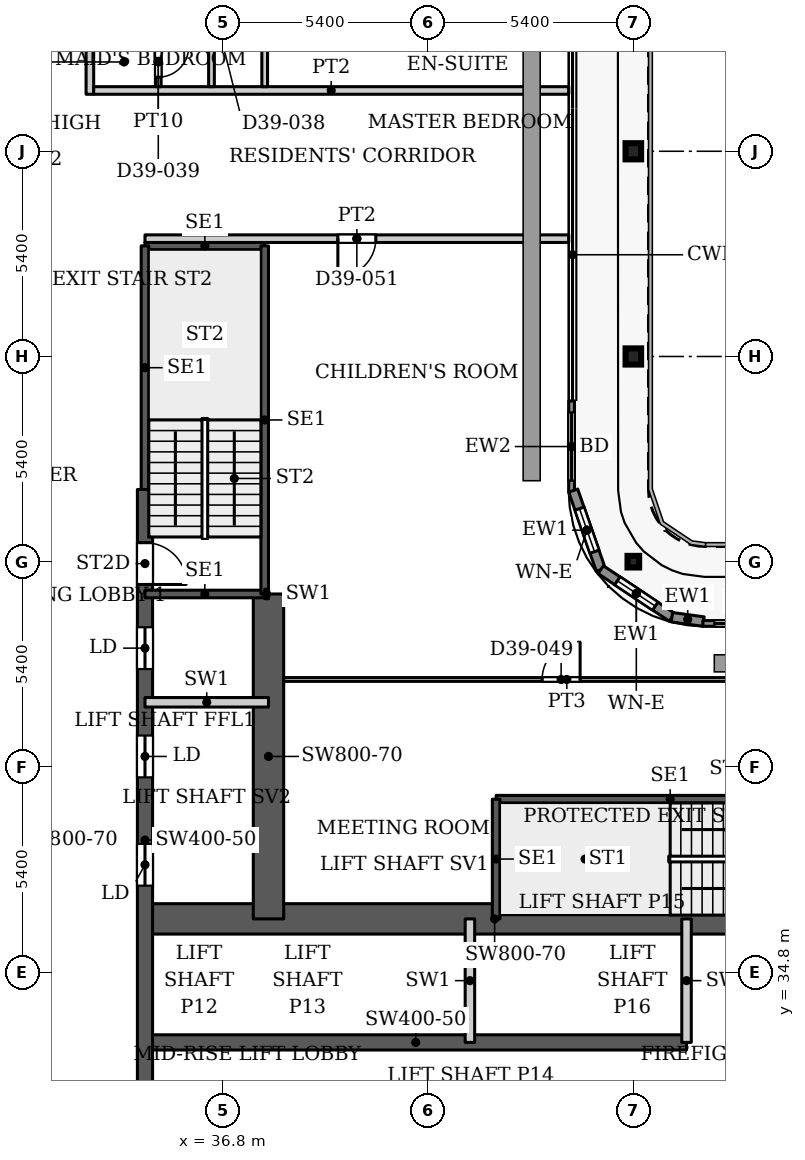
"""IFC4 building model, lengths in metres.
Left out: names, types, materials, properties, quantities, classifications, styles, units other than length and angle.
Written with IfcOpenShell. Run it as: python <this file> out.ifc"""

import sys

from ifc_helpers import new_model, si_unit, direction, frame, frame_2d, origin, origin_2d, place, context, subcontext, project, spatial, rectangle, hollow_rectangle, i_section, extrude, source, transform, mapped, element, fill, save


model = new_model("IFC4")
c1 = context("Model", 3, precision=1e-05, world=origin(), true_north=direction((0.0, 1.0)))
c2 = subcontext(c1, "Body", "Model", "MODEL_VIEW")
j1 = project(units=[si_unit("LENGTHUNIT", "METRE"), si_unit("PLANEANGLEUNIT", "RADIAN")], contexts=[c1])
p1 = place(None, origin())
s1 = spatial("IfcSite", under=j1, at=p1, CompositionType="ELEMENT")
p2 = place(p1, origin())
s2 = spatial("IfcBuilding", under=s1, at=p2, CompositionType="ELEMENT")
p3 = place(p2, frame((0.0, 0.0, 168.2)))
s3 = spatial("IfcBuildingStorey", under=s2, at=p3, CompositionType="ELEMENT", Elevation=168.2)
for number, where, z_axis, x_axis in (
    (1, (47.6, 51.0, 0.0), (0.0, 0.0, 1.0), (1.0, 0.0, 0.0)),
    (2, (47.6, 56.4, 0.0), (0.0, 0.0, 1.0), (1.0, 0.0, 0.0)),
):
    element("IfcColumn", number, at=place(p3, frame(where, z_axis=z_axis, x_axis=x_axis)), inside=s3, PredefinedType="COLUMN", context=c2, shape_type="SweptSolid", body=[
        extrude(i_section(OverallWidth=0.409, OverallDepth=0.425, WebThickness=0.033, FlangeThickness=0.052, FilletRadius=0.013, at=origin_2d()), origin(), (0.0, 0.0, 1.0), 3.9),
    ])
p4 = place(p3, frame((47.6, 45.6, 0.0), z_axis=(0.0, 0.0, 1.0), x_axis=(1.0, 0.0, 0.0)))
e3 = element("IfcColumn", 3, at=p4, inside=s3, PredefinedType="COLUMN", context=c2, shape_type="SweptSolid", body=[
    extrude(hollow_rectangle(XDim=0.305, YDim=0.305, WallThickness=0.016, InnerFilletRadius=0.016, OuterFilletRadius=0.032, at=origin_2d()), origin(), (0.0, 0.0, 1.0), 3.9),
])
p5 = place(p3, frame((34.75, 32.95, 0.0), z_axis=(0.0, 0.0, 1.0), x_axis=(1.0, 0.0, 0.0)))
e4 = element("IfcWall", 4, at=p5, inside=s3, PredefinedType="SHEAR", context=c2, shape_type="SweptSolid", body=[
    extrude(rectangle(XDim=14.25, YDim=0.4, at=frame_2d((7.125, 0.0))), origin(), (0.0, 0.0, 1.0), 3.9),
])
p6 = place(p3, frame((34.75, 36.2, 0.0), z_axis=(0.0, 0.0, 1.0), x_axis=(1.0, 0.0, 0.0)))
e5 = element("IfcWall", 5, at=p6, inside=s3, PredefinedType="SHEAR", context=c2, shape_type="SweptSolid", body=[
    extrude(rectangle(XDim=18.4, YDim=0.8, at=frame_2d((9.2, 0.0))), origin(), (0.0, 0.0, 1.0), 3.9),
])
p7 = place(p6, frame((16.9, 0.0, 0.0)))
e6 = element("IfcOpeningElement", 6, at=p7, cuts=e5, PredefinedType="OPENING", context=c2, shape_type="SweptSolid", body=[
    extrude(rectangle(XDim=1.0, YDim=2.2, at=frame_2d((0.5, 1.1))), frame((0.0, 0.41, 0.0), z_axis=(0.0, -1.0, 0.0), x_axis=(1.0, 0.0, 0.0)), (0.0, 0.0, 1.0), 0.82),
])
p8 = place(p3, frame((34.75, 29.05, 0.0), z_axis=(0.0, 0.0, 1.0), x_axis=(0.0, 1.0, 0.0)))
e7 = element("IfcWall", 7, at=p8, inside=s3, PredefinedType="SHEAR", context=c2, shape_type="SweptSolid", body=[
    extrude(rectangle(XDim=18.45, YDim=0.4, at=frame_2d((9.225, 0.0))), origin(), (0.0, 0.0, 1.0), 3.9),
])
p9 = place(p8, frame((8.025, 0.0, 0.0)))
e8 = element("IfcOpeningElement", 8, at=p9, cuts=e7, PredefinedType="OPENING", context=c2, shape_type="SweptSolid", body=[
    extrude(rectangle(XDim=1.1, YDim=2.2, at=frame_2d((0.55, 1.1))), frame((0.0, 0.21, 0.0), z_axis=(0.0, -1.0, 0.0), x_axis=(1.0, 0.0, 0.0)), (0.0, 0.0, 1.0), 0.42),
])
p10 = place(p8, frame((10.875, 0.0, 0.0)))
e9 = element("IfcOpeningElement", 9, at=p10, cuts=e7, PredefinedType="OPENING", context=c2, shape_type="SweptSolid", body=[
    extrude(rectangle(XDim=1.1, YDim=2.2, at=frame_2d((0.55, 1.1))), frame((0.0, 0.21, 0.0), z_axis=(0.0, -1.0, 0.0), x_axis=(1.0, 0.0, 0.0)), (0.0, 0.0, 1.0), 0.42),
])
p11 = place(p8, frame((13.725, 0.0, 0.0)))
e10 = element("IfcOpeningElement", 10, at=p11, cuts=e7, PredefinedType="OPENING", context=c2, shape_type="SweptSolid", body=[
    extrude(rectangle(XDim=1.1, YDim=2.2, at=frame_2d((0.55, 1.1))), frame((0.0, 0.21, 0.0), z_axis=(0.0, -1.0, 0.0), x_axis=(1.0, 0.0, 0.0)), (0.0, 0.0, 1.0), 0.42),
])
p12 = place(p8, frame((15.95, 0.0, 0.0)))
e11 = element("IfcOpeningElement", 11, at=p12, cuts=e7, PredefinedType="OPENING", context=c2, shape_type="SweptSolid", body=[
    extrude(rectangle(XDim=1.1, YDim=2.2, at=frame_2d((0.55, 1.1))), frame((0.0, 0.21, 0.0), z_axis=(0.0, -1.0, 0.0), x_axis=(1.0, 0.0, 0.0)), (0.0, 0.0, 1.0), 0.42),
])
p13 = place(p3, frame((38.0, 36.2, 0.0), z_axis=(0.0, 0.0, 1.0), x_axis=(0.0, 1.0, 0.0)))
e12 = element("IfcWall", 12, at=p13, inside=s3, PredefinedType="SHEAR", context=c2, shape_type="SweptSolid", body=[
    extrude(rectangle(XDim=8.55, YDim=0.8, at=frame_2d((4.275, 0.0))), origin(), (0.0, 0.0, 1.0), 3.9),
])
p14 = place(p3, frame((45.975, 49.83, 0.0), z_axis=(0.0, 0.0, 1.0), x_axis=(0.0, -1.0, 0.0)))
e13 = element("IfcWall", 13, at=p14, inside=s3, PredefinedType="SOLIDWALL", context=c2, shape_type="SweptSolid", body=[
    extrude(rectangle(XDim=2.4, YDim=0.15, at=frame_2d((1.2, 0.0))), origin(), (0.0, 0.0, 1.0), 3.75),
])
p15 = place(p14, frame((0.3, 0.0, 0.0)))
e14 = element("IfcOpeningElement", 14, at=p15, cuts=e13, PredefinedType="OPENING", context=c2, shape_type="SweptSolid", body=[
    extrude(rectangle(XDim=1.8, YDim=2.4, at=frame_2d((0.9, 1.2))), frame((0.0, 0.085, 0.0), z_axis=(0.0, -1.0, 0.0), x_axis=(1.0, 0.0, 0.0)), (0.0, 0.0, 1.0), 0.17),
])
p16 = place(p3, frame((46.018, 47.471, 0.0), z_axis=(0.0, 0.0, 1.0), x_axis=(0.328791208903, -0.944402637093, 0.0)))
e15 = element("IfcWall", 15, at=p16, inside=s3, PredefinedType="SOLIDWALL", context=c2, shape_type="SweptSolid", body=[
    extrude(rectangle(XDim=2.205, YDim=0.25, at=frame_2d((1.102, 0.0))), origin(), (0.0, 0.0, 1.0), 3.75),
])
p17 = place(p16, frame((0.503, 0.0, 0.6)))
e16 = element("IfcOpeningElement", 16, at=p17, cuts=e15, PredefinedType="OPENING", context=c2, shape_type="SweptSolid", body=[
    extrude(rectangle(XDim=1.2, YDim=2.1, at=frame_2d((0.6, 1.05))), frame((0.0, 0.135, 0.0), z_axis=(0.0, -1.0, 0.0), x_axis=(1.0, 0.0, 0.0)), (0.0, 0.0, 1.0), 0.27),
])
p18 = place(p3, frame((46.743, 45.389, 0.0), z_axis=(0.0, 0.0, 1.0), x_axis=(0.831449265529, -0.555600682912, 0.0)))
e17 = element("IfcWall", 17, at=p18, inside=s3, PredefinedType="SOLIDWALL", context=c2, shape_type="SweptSolid", body=[
    extrude(rectangle(XDim=2.251, YDim=0.25, at=frame_2d((1.126, 0.0))), origin(), (0.0, 0.0, 1.0), 3.75),
])
p19 = place(p18, frame((0.525, 0.0, 0.6)))
e18 = element("IfcOpeningElement", 18, at=p19, cuts=e17, PredefinedType="OPENING", context=c2, shape_type="SweptSolid", body=[
    extrude(rectangle(XDim=1.2, YDim=2.1, at=frame_2d((0.6, 1.05))), frame((0.0, 0.135, 0.0), z_axis=(0.0, -1.0, 0.0), x_axis=(1.0, 0.0, 0.0)), (0.0, 0.0, 1.0), 0.27),
])
p20 = place(p3, frame((48.615, 44.138, 0.0), z_axis=(0.0, 0.0, 1.0), x_axis=(0.990741504246, -0.135761819977, 0.0)))
e19 = element("IfcWall", 19, at=p20, inside=s3, PredefinedType="SOLIDWALL", context=c2, shape_type="SweptSolid", body=[
    extrude(rectangle(XDim=0.84, YDim=0.25, at=frame_2d((0.42, 0.0))), origin(), (0.0, 0.0, 1.0), 3.75),
])
p21 = place(p3, frame((49.43, 43.975, 0.0), z_axis=(0.0, 0.0, 1.0), x_axis=(1.0, 0.0, 0.0)))
e20 = element("IfcWall", 20, at=p21, inside=s3, PredefinedType="SOLIDWALL", context=c2, shape_type="SweptSolid", body=[
    extrude(rectangle(XDim=2.4, YDim=0.15, at=frame_2d((1.2, 0.0))), origin(), (0.0, 0.0, 1.0), 3.75),
])
p22 = place(p21, frame((0.3, 0.0, 0.0)))
e21 = element("IfcOpeningElement", 21, at=p22, cuts=e20, PredefinedType="OPENING", context=c2, shape_type="SweptSolid", body=[
    extrude(rectangle(XDim=1.8, YDim=2.4, at=frame_2d((0.9, 1.2))), frame((0.0, 0.085, 0.0), z_axis=(0.0, -1.0, 0.0), x_axis=(1.0, 0.0, 0.0)), (0.0, 0.0, 1.0), 0.17),
])
p23 = place(p3, frame((43.99, 39.35, 0.0), z_axis=(0.0, 0.0, 1.0), x_axis=(1.0, 0.0, 0.0)))
e22 = element("IfcWall", 22, at=p23, inside=s3, PredefinedType="SHEAR", context=c2, shape_type="SweptSolid", body=[
    extrude(rectangle(XDim=9.16, YDim=0.2, at=frame_2d((4.58, 0.0))), origin(), (0.0, 0.0, 1.0), 3.9),
])
p24 = place(p3, frame((43.99, 36.2, 0.0), z_axis=(0.0, 0.0, 1.0), x_axis=(0.0, 1.0, 0.0)))
e23 = element("IfcWall", 23, at=p24, inside=s3, PredefinedType="SHEAR", context=c2, shape_type="SweptSolid", body=[
    extrude(rectangle(XDim=3.15, YDim=0.2, at=frame_2d((1.575, 0.0))), origin(), (0.0, 0.0, 1.0), 3.9),
])
for number, where, z_axis, x_axis in (
    (24, (34.75, 44.75, 0.0), (0.0, 0.0, 1.0), (1.0, 0.0, 0.0)),
    (25, (34.75, 53.91, 0.0), (0.0, 0.0, 1.0), (1.0, 0.0, 0.0)),
):
    element("IfcWall", number, at=place(p3, frame(where, z_axis=z_axis, x_axis=x_axis)), inside=s3, PredefinedType="SHEAR", context=c2, shape_type="SweptSolid", body=[
        extrude(rectangle(XDim=3.15, YDim=0.2, at=frame_2d((1.575, 0.0))), origin(), (0.0, 0.0, 1.0), 3.9),
    ])
p25 = place(p3, frame((34.75, 47.5, 0.0), z_axis=(0.0, 0.0, 1.0), x_axis=(0.0, 1.0, 0.0)))
e26 = element("IfcWall", 26, at=p25, inside=s3, PredefinedType="SHEAR", context=c2, shape_type="SweptSolid", body=[
    extrude(rectangle(XDim=6.41, YDim=0.2, at=frame_2d((3.205, 0.0))), origin(), (0.0, 0.0, 1.0), 3.9),
])
p26 = place(p3, frame((37.9, 44.75, 0.0), z_axis=(0.0, 0.0, 1.0), x_axis=(0.0, 1.0, 0.0)))
e27 = element("IfcWall", 27, at=p26, inside=s3, PredefinedType="SHEAR", context=c2, shape_type="SweptSolid", body=[
    extrude(rectangle(XDim=9.16, YDim=0.2, at=frame_2d((4.58, 0.0))), origin(), (0.0, 0.0, 1.0), 3.9),
])
for number, where, z_axis, x_axis in (
    (28, (43.3, 32.95, 0.0), (0.0, 0.0, 1.0), (0.0, 1.0, 0.0)),
    (29, (49.0, 32.95, 0.0), (0.0, 0.0, 1.0), (0.0, 1.0, 0.0)),
    (30, (34.75, 41.9, 0.0), (0.0, 0.0, 1.0), (1.0, 0.0, 0.0)),
):
    element("IfcWall", number, at=place(p3, frame(where, z_axis=z_axis, x_axis=x_axis)), inside=s3, PredefinedType="PARTITIONING", context=c2, shape_type="SweptSolid", body=[
        extrude(rectangle(XDim=3.25, YDim=0.25, at=frame_2d((1.625, 0.0))), origin(), (0.0, 0.0, 1.0), 3.9),
    ])
p27 = place(p3, frame((37.9, 44.75, 0.0), z_axis=(0.0, 0.0, 1.0), x_axis=(1.0, 0.0, 0.0)))
e31 = element("IfcWall", 31, at=p27, inside=s3, PredefinedType="PARTITIONING", context=c2, shape_type="SweptSolid", body=[
    extrude(rectangle(XDim=0.1, YDim=0.25, at=frame_2d((0.05, 0.0))), origin(), (0.0, 0.0, 1.0), 3.9),
])
p28 = place(p3, frame((33.3, 57.9, 0.0), z_axis=(0.0, 0.0, 1.0), x_axis=(0.0, 1.0, 0.0)))
e32 = element("IfcWall", 32, at=p28, inside=s3, PredefinedType="PARTITIONING", context=c2, shape_type="SweptSolid", body=[
    extrude(rectangle(XDim=17.6, YDim=0.2, at=frame_2d((8.8, 0.0))), origin(), (0.0, 0.0, 1.0), 3.6),
])
p29 = place(p28, frame((6.8, 0.0, 0.0)))
e33 = element("IfcOpeningElement", 33, at=p29, cuts=e32, PredefinedType="OPENING", context=c2, shape_type="SweptSolid", body=[
    extrude(rectangle(XDim=1.0, YDim=2.1, at=frame_2d((0.5, 1.05))), frame((0.0, 0.11, 0.0), z_axis=(0.0, -1.0, 0.0), x_axis=(1.0, 0.0, 0.0)), (0.0, 0.0, 1.0), 0.22),
])
p30 = place(p3, frame((33.4, 58.0, 0.0), z_axis=(0.0, 0.0, 1.0), x_axis=(1.0, 0.0, 0.0)))
e34 = element("IfcWall", 34, at=p30, inside=s3, PredefinedType="PARTITIONING", context=c2, shape_type="SweptSolid", body=[
    extrude(rectangle(XDim=12.5, YDim=0.2, at=frame_2d((6.25, 0.0))), origin(), (0.0, 0.0, 1.0), 3.6),
])
p31 = place(p3, frame((34.75, 54.1, 0.0), z_axis=(0.0, 0.0, 1.0), x_axis=(1.0, 0.0, 0.0)))
e35 = element("IfcWall", 35, at=p31, inside=s3, PredefinedType="PARTITIONING", context=c2, shape_type="SweptSolid", body=[
    extrude(rectangle(XDim=11.15, YDim=0.2, at=frame_2d((5.575, 0.0))), origin(), (0.0, 0.0, 1.0), 3.6),
])
p32 = place(p31, frame((5.075, 0.0, 0.0)))
e36 = element("IfcOpeningElement", 36, at=p32, cuts=e35, PredefinedType="OPENING", context=c2, shape_type="SweptSolid", body=[
    extrude(rectangle(XDim=1.0, YDim=2.1, at=frame_2d((0.5, 1.05))), frame((0.0, 0.11, 0.0), z_axis=(0.0, -1.0, 0.0), x_axis=(1.0, 0.0, 0.0)), (0.0, 0.0, 1.0), 0.22),
])
p33 = place(p3, frame((35.1, 58.1, 0.0), z_axis=(0.0, 0.0, 1.0), x_axis=(0.0, 1.0, 0.0)))
e37 = element("IfcWall", 37, at=p33, inside=s3, PredefinedType="PARTITIONING", context=c2, shape_type="SweptSolid", body=[
    extrude(rectangle(XDim=1.325, YDim=0.15, at=frame_2d((0.663, 0.0))), origin(), (0.0, 0.0, 1.0), 3.6),
])
p34 = place(p33, frame((0.25, 0.0, 0.0)))
e38 = element("IfcOpeningElement", 38, at=p34, cuts=e37, PredefinedType="OPENING", context=c2, shape_type="SweptSolid", body=[
    extrude(rectangle(XDim=0.8, YDim=2.1, at=frame_2d((0.4, 1.05))), frame((0.0, 0.085, 0.0), z_axis=(0.0, -1.0, 0.0), x_axis=(1.0, 0.0, 0.0)), (0.0, 0.0, 1.0), 0.17),
])
p35 = place(p3, frame((36.5, 58.1, 0.0), z_axis=(0.0, 0.0, 1.0), x_axis=(0.0, 1.0, 0.0)))
e39 = element("IfcWall", 39, at=p35, inside=s3, PredefinedType="PARTITIONING", context=c2, shape_type="SweptSolid", body=[
    extrude(rectangle(XDim=5.975, YDim=0.15, at=frame_2d((2.987, 0.0))), origin(), (0.0, 0.0, 1.0), 3.6),
])
p36 = place(p35, frame((4.15, 0.0, 0.0)))
e40 = element("IfcOpeningElement", 40, at=p36, cuts=e39, PredefinedType="OPENING", context=c2, shape_type="SweptSolid", body=[
    extrude(rectangle(XDim=0.8, YDim=2.1, at=frame_2d((0.4, 1.05))), frame((0.0, 0.085, 0.0), z_axis=(0.0, -1.0, 0.0), x_axis=(1.0, 0.0, 0.0)), (0.0, 0.0, 1.0), 0.17),
])
p37 = place(p35, frame((1.9, 0.0, 0.0)))
e41 = element("IfcOpeningElement", 41, at=p37, cuts=e39, PredefinedType="OPENING", context=c2, shape_type="SweptSolid", body=[
    extrude(rectangle(XDim=0.8, YDim=2.1, at=frame_2d((0.4, 1.05))), frame((0.0, 0.085, 0.0), z_axis=(0.0, -1.0, 0.0), x_axis=(1.0, 0.0, 0.0)), (0.0, 0.0, 1.0), 0.17),
])
p38 = place(p3, frame((37.9, 58.1, 0.0), z_axis=(0.0, 0.0, 1.0), x_axis=(0.0, 1.0, 0.0)))
e42 = element("IfcWall", 42, at=p38, inside=s3, PredefinedType="PARTITIONING", context=c2, shape_type="SweptSolid", body=[
    extrude(rectangle(XDim=17.2, YDim=0.15, at=frame_2d((8.6, 0.0))), origin(), (0.0, 0.0, 1.0), 3.6),
])
p39 = place(p38, frame((1.1, 0.0, 0.0)))
e43 = element("IfcOpeningElement", 43, at=p39, cuts=e42, PredefinedType="OPENING", context=c2, shape_type="SweptSolid", body=[
    extrude(rectangle(XDim=0.9, YDim=2.1, at=frame_2d((0.45, 1.05))), frame((0.0, 0.085, 0.0), z_axis=(0.0, -1.0, 0.0), x_axis=(1.0, 0.0, 0.0)), (0.0, 0.0, 1.0), 0.17),
])
p40 = place(p38, frame((8.15, 0.0, 0.0)))
e44 = element("IfcOpeningElement", 44, at=p40, cuts=e42, PredefinedType="OPENING", context=c2, shape_type="SweptSolid", body=[
    extrude(rectangle(XDim=0.9, YDim=2.1, at=frame_2d((0.45, 1.05))), frame((0.0, 0.085, 0.0), z_axis=(0.0, -1.0, 0.0), x_axis=(1.0, 0.0, 0.0)), (0.0, 0.0, 1.0), 0.17),
])
p41 = place(p38, frame((14.85, 0.0, 0.0)))
e45 = element("IfcOpeningElement", 45, at=p41, cuts=e42, PredefinedType="OPENING", context=c2, shape_type="SweptSolid", body=[
    extrude(rectangle(XDim=1.0, YDim=2.1, at=frame_2d((0.5, 1.05))), frame((0.0, 0.085, 0.0), z_axis=(0.0, -1.0, 0.0), x_axis=(1.0, 0.0, 0.0)), (0.0, 0.0, 1.0), 0.17),
])
p42 = place(p38, frame((10.95, 0.0, 0.0)))
e46 = element("IfcOpeningElement", 46, at=p42, cuts=e42, PredefinedType="OPENING", context=c2, shape_type="SweptSolid", body=[
    extrude(rectangle(XDim=1.6, YDim=2.1, at=frame_2d((0.8, 1.05))), frame((0.0, 0.085, 0.0), z_axis=(0.0, -1.0, 0.0), x_axis=(1.0, 0.0, 0.0)), (0.0, 0.0, 1.0), 0.17),
])
p43 = place(p38, frame((5.75, 0.0, 0.0)))
e47 = element("IfcOpeningElement", 47, at=p43, cuts=e42, PredefinedType="OPENING", context=c2, shape_type="SweptSolid", body=[
    extrude(rectangle(XDim=0.9, YDim=2.1, at=frame_2d((0.45, 1.05))), frame((0.0, 0.085, 0.0), z_axis=(0.0, -1.0, 0.0), x_axis=(1.0, 0.0, 0.0)), (0.0, 0.0, 1.0), 0.17),
])
p44 = place(p3, frame((38.399, 42.5, 0.0), z_axis=(0.0, 0.0, 1.0), x_axis=(1.0, 0.0, 0.0)))
e48 = element("IfcWall", 48, at=p44, inside=s3, PredefinedType="PARTITIONING", context=c2, shape_type="SweptSolid", body=[
    extrude(rectangle(XDim=14.901, YDim=0.1, at=frame_2d((7.451, 0.0))), origin(), (0.0, 0.0, 1.0), 3.6),
])
p45 = place(p44, frame((6.801, 0.0, 0.0)))
e49 = element("IfcOpeningElement", 49, at=p45, cuts=e48, PredefinedType="OPENING", context=c2, shape_type="SweptSolid", body=[
    extrude(rectangle(XDim=1.0, YDim=2.1, at=frame_2d((0.5, 1.05))), frame((0.0, 0.06, 0.0), z_axis=(0.0, -1.0, 0.0), x_axis=(1.0, 0.0, 0.0)), (0.0, 0.0, 1.0), 0.12),
])
m1 = source(origin(), c2, "Body", "SweptSolid", [
    extrude(rectangle(XDim=1.8, YDim=2.4, at=frame_2d((0.9, 1.2))), frame((0.0, 0.025, 0.0), z_axis=(0.0, -1.0, 0.0), x_axis=(1.0, 0.0, 0.0)), (0.0, 0.0, 1.0), 0.05),
])
p46 = place(p15, origin())
e50 = element("IfcDoor", 50, at=p46, inside=s3, OperationType="SLIDING_TO_LEFT", PredefinedType="DOOR", context=c2, shape_type="MappedRepresentation", body=[
    mapped(m1, transform((0.0, 0.0, 0.0), x_axis=(1.0, 0.0, 0.0), y_axis=(0.0, 1.0, 0.0), z_axis=(0.0, 0.0, 1.0), scale=1.0)),
])
fill(e14, e50)
m2 = source(origin(), c2, "Body", "SweptSolid", [
    extrude(rectangle(XDim=1.2, YDim=2.1, at=frame_2d((0.6, 1.05))), frame((0.0, 0.03, 0.0), z_axis=(0.0, -1.0, 0.0), x_axis=(1.0, 0.0, 0.0)), (0.0, 0.0, 1.0), 0.06),
])
p47 = place(p17, origin())
e51 = element("IfcWindow", 51, at=p47, inside=s3, PartitioningType="SINGLE_PANEL", PredefinedType="WINDOW", context=c2, shape_type="MappedRepresentation", body=[
    mapped(m2, transform((0.0, 0.0, 0.0), x_axis=(1.0, 0.0, 0.0), y_axis=(0.0, 1.0, 0.0), z_axis=(0.0, 0.0, 1.0), scale=1.0)),
])
fill(e16, e51)
p48 = place(p19, origin())
e52 = element("IfcWindow", 52, at=p48, inside=s3, PartitioningType="SINGLE_PANEL", PredefinedType="WINDOW", context=c2, shape_type="MappedRepresentation", body=[
    mapped(m2, transform((0.0, 0.0, 0.0), x_axis=(1.0, 0.0, 0.0), y_axis=(0.0, 1.0, 0.0), z_axis=(0.0, 0.0, 1.0), scale=1.0)),
])
fill(e18, e52)
p49 = place(p22, origin())
e53 = element("IfcDoor", 53, at=p49, inside=s3, OperationType="SLIDING_TO_LEFT", PredefinedType="DOOR", context=c2, shape_type="MappedRepresentation", body=[
    mapped(m1, transform((0.0, 0.0, 0.0), x_axis=(1.0, 0.0, 0.0), y_axis=(0.0, 1.0, 0.0), z_axis=(0.0, 0.0, 1.0), scale=1.0)),
])
fill(e21, e53)
m3 = source(origin(), c2, "Body", "SweptSolid", [
    extrude(rectangle(XDim=1.1, YDim=2.2, at=frame_2d((0.55, 1.1))), frame((0.0, 0.025, 0.0), z_axis=(0.0, -1.0, 0.0), x_axis=(1.0, 0.0, 0.0)), (0.0, 0.0, 1.0), 0.05),
])
p50 = place(p9, origin())
e54 = element("IfcDoor", 54, at=p50, inside=s3, OperationType="SLIDING_TO_LEFT", PredefinedType="DOOR", context=c2, shape_type="MappedRepresentation", body=[
    mapped(m3, transform((0.0, 0.0, 0.0), x_axis=(1.0, 0.0, 0.0), y_axis=(0.0, 1.0, 0.0), z_axis=(0.0, 0.0, 1.0), scale=1.0)),
])
fill(e8, e54)
p51 = place(p10, origin())
e55 = element("IfcDoor", 55, at=p51, inside=s3, OperationType="SLIDING_TO_LEFT", PredefinedType="DOOR", context=c2, shape_type="MappedRepresentation", body=[
    mapped(m3, transform((0.0, 0.0, 0.0), x_axis=(1.0, 0.0, 0.0), y_axis=(0.0, 1.0, 0.0), z_axis=(0.0, 0.0, 1.0), scale=1.0)),
])
fill(e9, e55)
p52 = place(p11, origin())
e56 = element("IfcDoor", 56, at=p52, inside=s3, OperationType="SLIDING_TO_LEFT", PredefinedType="DOOR", context=c2, shape_type="MappedRepresentation", body=[
    mapped(m3, transform((0.0, 0.0, 0.0), x_axis=(1.0, 0.0, 0.0), y_axis=(0.0, 1.0, 0.0), z_axis=(0.0, 0.0, 1.0), scale=1.0)),
])
fill(e10, e56)
m4 = source(origin(), c2, "Body", "SweptSolid", [
    extrude(rectangle(XDim=1.1, YDim=2.2, at=frame_2d((0.55, 1.1))), frame((0.0, 0.025, 0.0), z_axis=(0.0, -1.0, 0.0), x_axis=(1.0, 0.0, 0.0)), (0.0, 0.0, 1.0), 0.05),
])
p53 = place(p12, origin())
e57 = element("IfcDoor", 57, at=p53, inside=s3, OperationType="SINGLE_SWING_RIGHT", PredefinedType="DOOR", context=c2, shape_type="MappedRepresentation", body=[
    mapped(m4, transform((0.0, 0.0, 0.0), x_axis=(1.0, 0.0, 0.0), y_axis=(0.0, 1.0, 0.0), z_axis=(0.0, 0.0, 1.0), scale=1.0)),
])
fill(e11, e57)
m5 = source(origin(), c2, "Body", "SweptSolid", [
    extrude(rectangle(XDim=0.8, YDim=2.1, at=frame_2d((0.4, 1.05))), frame((0.0, 0.025, 0.0), z_axis=(0.0, -1.0, 0.0), x_axis=(1.0, 0.0, 0.0)), (0.0, 0.0, 1.0), 0.05),
])
p54 = place(p34, origin())
e58 = element("IfcDoor", 58, at=p54, inside=s3, OperationType="SINGLE_SWING_RIGHT", PredefinedType="DOOR", context=c2, shape_type="MappedRepresentation", body=[
    mapped(m5, transform((0.0, 0.0, 0.0), x_axis=(1.0, 0.0, 0.0), y_axis=(0.0, 1.0, 0.0), z_axis=(0.0, 0.0, 1.0), scale=1.0)),
])
fill(e38, e58)
m6 = source(origin(), c2, "Body", "SweptSolid", [
    extrude(rectangle(XDim=1.0, YDim=2.1, at=frame_2d((0.5, 1.05))), frame((0.0, 0.025, 0.0), z_axis=(0.0, -1.0, 0.0), x_axis=(1.0, 0.0, 0.0)), (0.0, 0.0, 1.0), 0.05),
])
p55 = place(p45, origin())
e59 = element("IfcDoor", 59, at=p55, inside=s3, OperationType="SINGLE_SWING_LEFT", PredefinedType="DOOR", context=c2, shape_type="MappedRepresentation", body=[
    mapped(m6, transform((0.0, 0.0, 0.0), x_axis=(1.0, 0.0, 0.0), y_axis=(0.0, 1.0, 0.0), z_axis=(0.0, 0.0, 1.0), scale=1.0)),
])
fill(e49, e59)
m7 = source(origin(), c2, "Body", "SweptSolid", [
    extrude(rectangle(XDim=1.0, YDim=2.1, at=frame_2d((0.5, 1.05))), frame((0.0, 0.025, 0.0), z_axis=(0.0, -1.0, 0.0), x_axis=(1.0, 0.0, 0.0)), (0.0, 0.0, 1.0), 0.05),
])
p56 = place(p32, origin())
e60 = element("IfcDoor", 60, at=p56, inside=s3, OperationType="SINGLE_SWING_RIGHT", PredefinedType="DOOR", context=c2, shape_type="MappedRepresentation", body=[
    mapped(m7, transform((0.0, 0.0, 0.0), x_axis=(1.0, 0.0, 0.0), y_axis=(0.0, 1.0, 0.0), z_axis=(0.0, 0.0, 1.0), scale=1.0)),
])
fill(e36, e60)
save(model, sys.argv[1])
